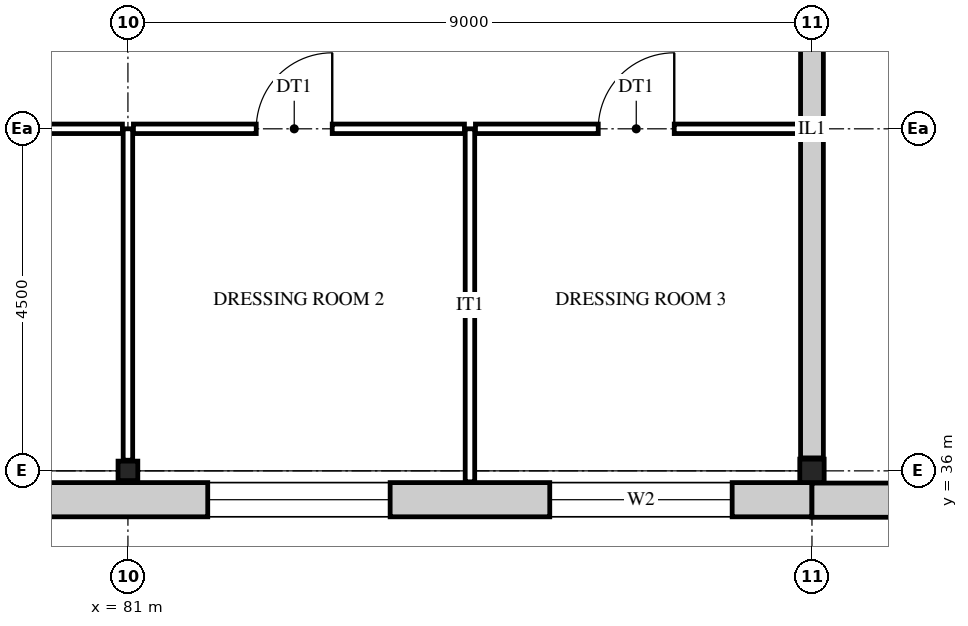
"""IFC4 building model, lengths in metres.
Left out: names, types, materials, properties, quantities, classifications, styles, units other than length and angle.
Written with IfcOpenShell. Run it as: python <this file> out.ifc"""

import sys

from ifc_helpers import new_model, si_unit, direction, frame, frame_2d, origin, origin_2d, place, context, subcontext, project, spatial, rectangle, i_section, extrude, element, fill, save


model = new_model("IFC4")
c1 = context("Model", 3, precision=1e-05, world=origin(), true_north=direction((0.0, 1.0)))
c2 = subcontext(c1, "Body", "Model", "MODEL_VIEW")
j1 = project(units=[si_unit("LENGTHUNIT", "METRE"), si_unit("PLANEANGLEUNIT", "RADIAN")], contexts=[c1])
p1 = place(None, origin())
s1 = spatial("IfcSite", under=j1, at=p1, CompositionType="ELEMENT")
p2 = place(p1, origin())
s2 = spatial("IfcBuilding", under=s1, at=p2, CompositionType="ELEMENT")
p3 = place(p2, frame((0.0, 0.0, 6.0)))
s3 = spatial("IfcBuildingStorey", under=s2, at=p3, CompositionType="ELEMENT", Elevation=6.0)
p4 = place(p3, frame((81.0, 36.0, 0.0), z_axis=(0.0, 0.0, 1.0), x_axis=(0.0, 1.0, 0.0)))
e1 = element("IfcColumn", 1, at=p4, inside=s3, PredefinedType="COLUMN", context=c2, shape_type="SweptSolid", body=[
    extrude(i_section(OverallWidth=0.256, OverallDepth=0.26, WebThickness=0.01, FlangeThickness=0.017, FilletRadius=0.014, at=origin_2d()), origin(), (0.0, 0.0, 1.0), 4.5),
])
p5 = place(p3, frame((90.0, 36.0, 0.0), z_axis=(0.0, 0.0, 1.0), x_axis=(0.0, 1.0, 0.0)))
e2 = element("IfcColumn", 2, at=p5, inside=s3, PredefinedType="COLUMN", context=c2, shape_type="SweptSolid", body=[
    extrude(i_section(OverallWidth=0.309, OverallDepth=0.321, WebThickness=0.014, FlangeThickness=0.022, FilletRadius=0.017, at=origin_2d()), origin(), (0.0, 0.0, 1.0), 4.5),
])
p6 = place(p3, frame((90.0, 35.621, 0.0), z_axis=(0.0, 0.0, 1.0), x_axis=(-1.0, 0.0, 0.0)))
e3 = element("IfcWall", 3, at=p6, inside=s3, PredefinedType="STANDARD", context=c2, shape_type="SweptSolid", body=[
    extrude(rectangle(XDim=14.25, YDim=0.45, at=frame_2d((7.125, 0.0))), origin(), (0.0, 0.0, 1.0), 4.5),
])
p7 = place(p6, frame((10.05, 0.0, 0.9)))
e4 = element("IfcOpeningElement", 4, at=p7, cuts=e3, PredefinedType="OPENING", context=c2, shape_type="SweptSolid", body=[
    extrude(rectangle(XDim=2.4, YDim=2.8, at=frame_2d((1.2, 1.4))), frame((0.0, 0.235, 0.0), z_axis=(0.0, -1.0, 0.0), x_axis=(1.0, 0.0, 0.0)), (0.0, 0.0, 1.0), 0.47),
])
p8 = place(p6, frame((5.55, 0.0, 0.9)))
e5 = element("IfcOpeningElement", 5, at=p8, cuts=e3, PredefinedType="OPENING", context=c2, shape_type="SweptSolid", body=[
    extrude(rectangle(XDim=2.4, YDim=2.8, at=frame_2d((1.2, 1.4))), frame((0.0, 0.235, 0.0), z_axis=(0.0, -1.0, 0.0), x_axis=(1.0, 0.0, 0.0)), (0.0, 0.0, 1.0), 0.47),
])
p9 = place(p6, frame((1.05, 0.0, 0.9)))
e6 = element("IfcOpeningElement", 6, at=p9, cuts=e3, PredefinedType="OPENING", context=c2, shape_type="SweptSolid", body=[
    extrude(rectangle(XDim=2.4, YDim=2.8, at=frame_2d((1.2, 1.4))), frame((0.0, 0.235, 0.0), z_axis=(0.0, -1.0, 0.0), x_axis=(1.0, 0.0, 0.0)), (0.0, 0.0, 1.0), 0.47),
])
p10 = place(p3, frame((108.604, 35.615, 0.0), z_axis=(0.0, 0.0, 1.0), x_axis=(-1.0, 0.0, 0.0)))
e7 = element("IfcWall", 7, at=p10, inside=s3, PredefinedType="STANDARD", context=c2, shape_type="SweptSolid", body=[
    extrude(rectangle(XDim=18.604, YDim=0.45, at=frame_2d((9.302, 0.0))), origin(), (0.0, 0.0, 1.0), 4.5),
])
p11 = place(p3, frame((81.0, 36.14, 0.0), z_axis=(0.0, 0.0, 1.0), x_axis=(0.0, 1.0, 0.0)))
e8 = element("IfcWall", 8, at=p11, inside=s3, PredefinedType="PARTITIONING", context=c2, shape_type="SweptSolid", body=[
    extrude(rectangle(XDim=4.36, YDim=0.125, at=frame_2d((2.18, 0.0))), origin(), (0.0, 0.0, 1.0), 3.718),
])
p12 = place(p3, frame((85.5, 35.855, 0.0), z_axis=(0.0, 0.0, 1.0), x_axis=(0.0, 1.0, 0.0)))
e9 = element("IfcWall", 9, at=p12, inside=s3, PredefinedType="PARTITIONING", context=c2, shape_type="SweptSolid", body=[
    extrude(rectangle(XDim=4.645, YDim=0.125, at=frame_2d((2.322, 0.0))), origin(), (0.0, 0.0, 1.0), 3.718),
])
p13 = place(p3, frame((90.0, 36.17, 0.0), z_axis=(0.0, 0.0, 1.0), x_axis=(0.0, 1.0, 0.0)))
e10 = element("IfcWall", 10, at=p13, inside=s3, PredefinedType="STANDARD", context=c2, shape_type="SweptSolid", body=[
    extrude(rectangle(XDim=8.659, YDim=0.3, at=frame_2d((4.33, 0.0))), origin(), (0.0, 0.0, 1.0), 3.718),
])
p14 = place(p3, frame((76.81, 40.5, 0.0), z_axis=(0.0, 0.0, 1.0), x_axis=(1.0, 0.0, 0.0)))
e11 = element("IfcWall", 11, at=p14, inside=s3, PredefinedType="PARTITIONING", context=c2, shape_type="SweptSolid", body=[
    extrude(rectangle(XDim=4.117, YDim=0.125, at=frame_2d((2.059, 0.0))), origin(), (0.0, 0.0, 1.0), 3.718),
])
p15 = place(p14, frame((1.378, 0.0, 0.0)))
e12 = element("IfcOpeningElement", 12, at=p15, cuts=e11, PredefinedType="OPENING", context=c2, shape_type="SweptSolid", body=[
    extrude(rectangle(XDim=1.0, YDim=2.1, at=frame_2d((0.5, 1.05))), frame((0.0, 0.073, 0.0), z_axis=(0.0, -1.0, 0.0), x_axis=(1.0, 0.0, 0.0)), (0.0, 0.0, 1.0), 0.145),
])
p16 = place(p3, frame((81.073, 40.5, 0.0), z_axis=(0.0, 0.0, 1.0), x_axis=(1.0, 0.0, 0.0)))
e13 = element("IfcWall", 13, at=p16, inside=s3, PredefinedType="PARTITIONING", context=c2, shape_type="SweptSolid", body=[
    extrude(rectangle(XDim=4.355, YDim=0.125, at=frame_2d((2.177, 0.0))), origin(), (0.0, 0.0, 1.0), 3.718),
])
p17 = place(p16, frame((1.615, 0.0, 0.0)))
e14 = element("IfcOpeningElement", 14, at=p17, cuts=e13, PredefinedType="OPENING", context=c2, shape_type="SweptSolid", body=[
    extrude(rectangle(XDim=1.0, YDim=2.1, at=frame_2d((0.5, 1.05))), frame((0.0, 0.073, 0.0), z_axis=(0.0, -1.0, 0.0), x_axis=(1.0, 0.0, 0.0)), (0.0, 0.0, 1.0), 0.145),
])
p18 = place(p3, frame((85.573, 40.5, 0.0), z_axis=(0.0, 0.0, 1.0), x_axis=(1.0, 0.0, 0.0)))
e15 = element("IfcWall", 15, at=p18, inside=s3, PredefinedType="PARTITIONING", context=c2, shape_type="SweptSolid", body=[
    extrude(rectangle(XDim=4.268, YDim=0.125, at=frame_2d((2.134, 0.0))), origin(), (0.0, 0.0, 1.0), 3.718),
])
p19 = place(p18, frame((1.615, 0.0, 0.0)))
e16 = element("IfcOpeningElement", 16, at=p19, cuts=e15, PredefinedType="OPENING", context=c2, shape_type="SweptSolid", body=[
    extrude(rectangle(XDim=1.0, YDim=2.1, at=frame_2d((0.5, 1.05))), frame((0.0, 0.073, 0.0), z_axis=(0.0, -1.0, 0.0), x_axis=(1.0, 0.0, 0.0)), (0.0, 0.0, 1.0), 0.145),
])
p20 = place(p8, origin())
e17 = element("IfcWindow", 17, at=p20, inside=s3, PartitioningType="SINGLE_PANEL", PredefinedType="WINDOW", context=c2, shape_type="SweptSolid", body=[
    extrude(rectangle(XDim=2.4, YDim=2.8, at=frame_2d((1.2, 1.4))), frame((0.0, 0.03, 0.0), z_axis=(0.0, -1.0, 0.0), x_axis=(1.0, 0.0, 0.0)), (0.0, 0.0, 1.0), 0.06),
])
fill(e5, e17)
p21 = place(p9, origin())
e18 = element("IfcWindow", 18, at=p21, inside=s3, PartitioningType="SINGLE_PANEL", PredefinedType="WINDOW", context=c2, shape_type="SweptSolid", body=[
    extrude(rectangle(XDim=2.4, YDim=2.8, at=frame_2d((1.2, 1.4))), frame((0.0, 0.03, 0.0), z_axis=(0.0, -1.0, 0.0), x_axis=(1.0, 0.0, 0.0)), (0.0, 0.0, 1.0), 0.06),
])
fill(e6, e18)
p22 = place(p17, frame((1.0, 0.0, 0.0), z_axis=(0.0, 0.0, 1.0), x_axis=(-1.0, 0.0, 0.0)))
e19 = element("IfcDoor", 19, at=p22, inside=s3, OperationType="SINGLE_SWING_RIGHT", PredefinedType="DOOR", context=c2, shape_type="SweptSolid", body=[
    extrude(rectangle(XDim=1.0, YDim=2.1, at=frame_2d((0.5, 1.05))), frame((0.0, 0.025, 0.0), z_axis=(0.0, -1.0, 0.0), x_axis=(1.0, 0.0, 0.0)), (0.0, 0.0, 1.0), 0.05),
])
fill(e14, e19)
p23 = place(p19, frame((1.0, 0.0, 0.0), z_axis=(0.0, 0.0, 1.0), x_axis=(-1.0, 0.0, 0.0)))
e20 = element("IfcDoor", 20, at=p23, inside=s3, OperationType="SINGLE_SWING_RIGHT", PredefinedType="DOOR", context=c2, shape_type="SweptSolid", body=[
    extrude(rectangle(XDim=1.0, YDim=2.1, at=frame_2d((0.5, 1.05))), frame((0.0, 0.025, 0.0), z_axis=(0.0, -1.0, 0.0), x_axis=(1.0, 0.0, 0.0)), (0.0, 0.0, 1.0), 0.05),
])
fill(e16, e20)
save(model, sys.argv[1])
